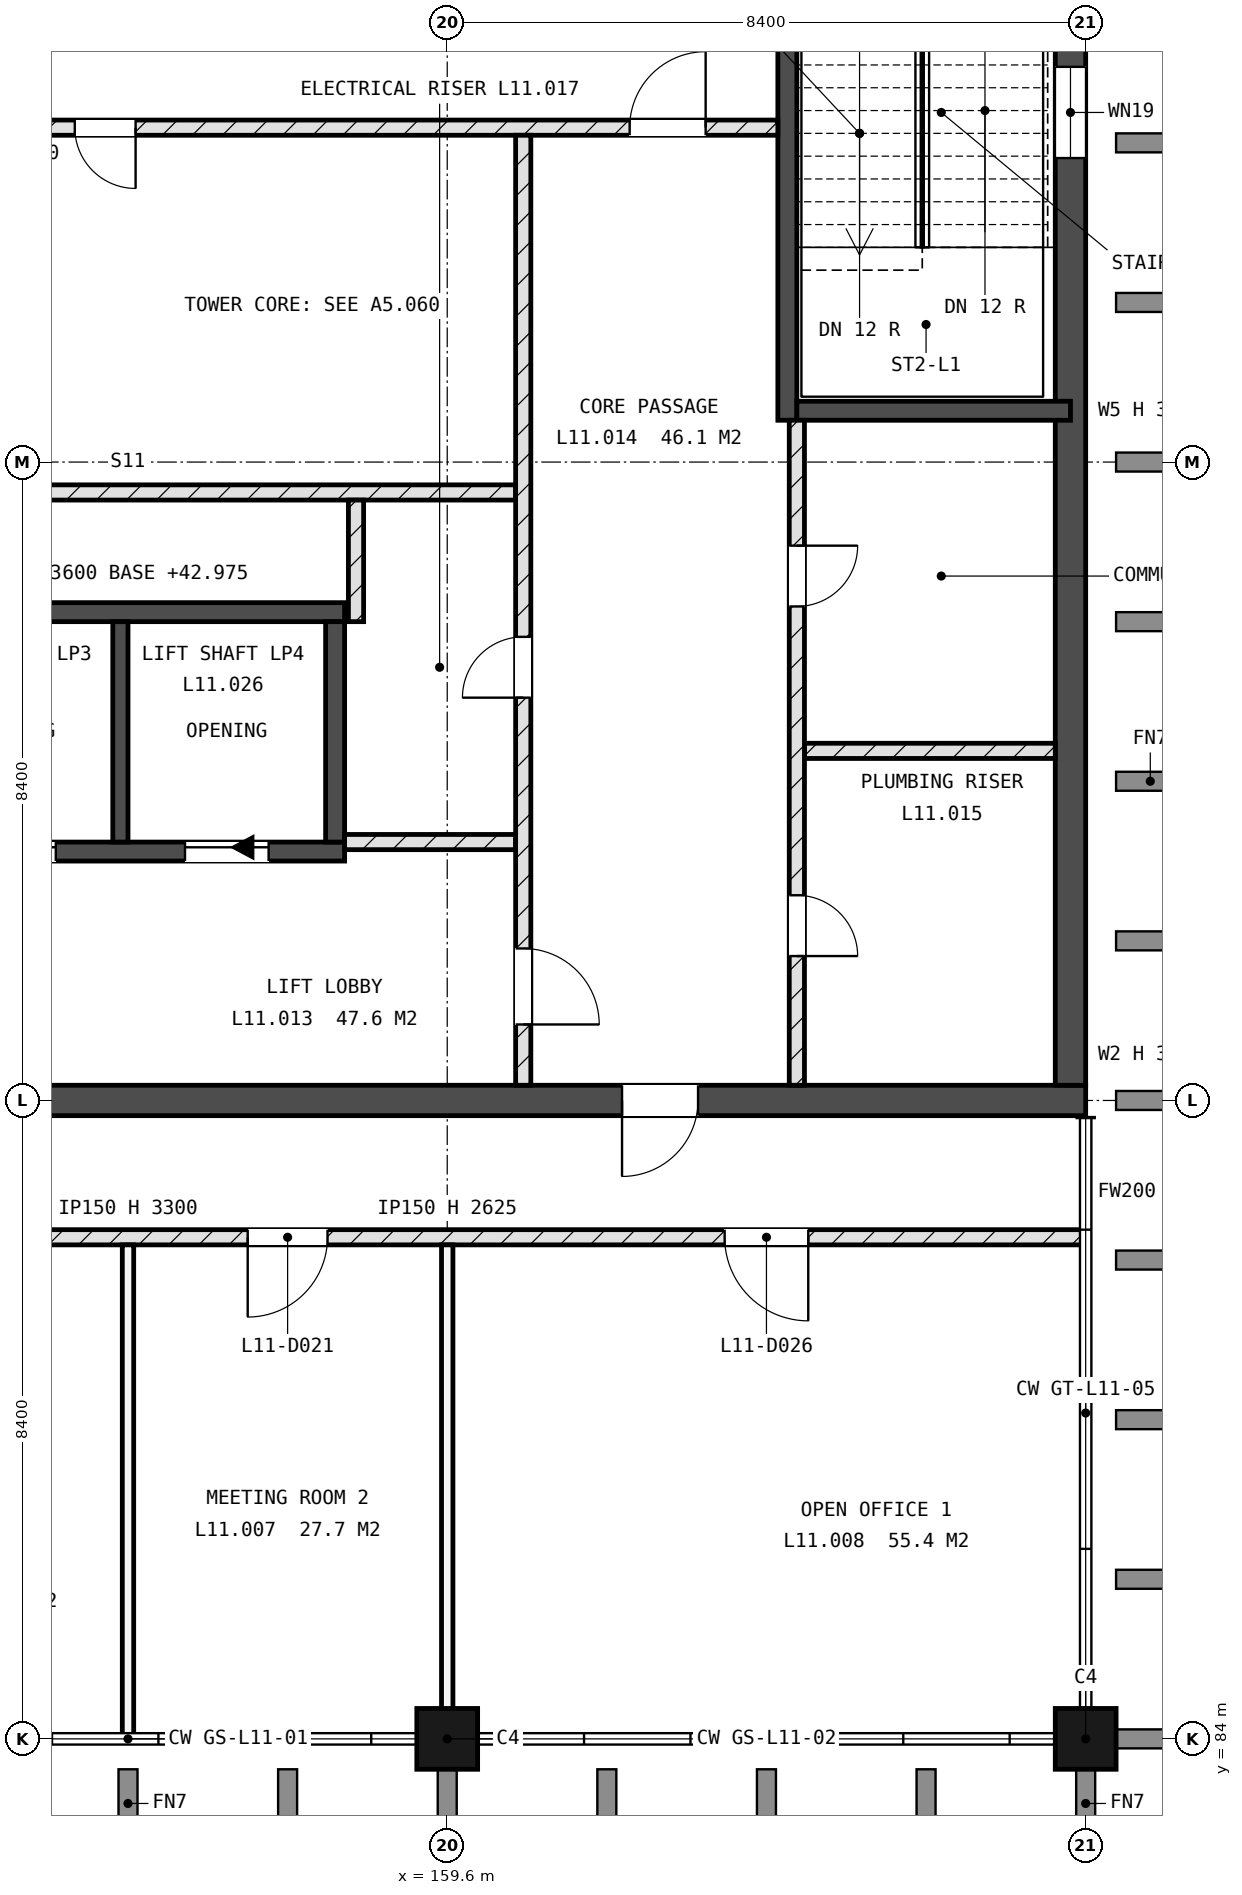
"""IFC4 building model, lengths in metres.
Left out: names, types, materials, properties, quantities, classifications, styles, units other than length and angle.
Written with IfcOpenShell. Run it as: python <this file> out.ifc"""

import sys

from ifc_helpers import new_model, si_unit, direction, frame, frame_2d, origin, origin_2d, place, context, subcontext, project, spatial, rectangle, extrude, element, fill, save


model = new_model("IFC4")
c1 = context("Model", 3, precision=1e-05, world=origin(), true_north=direction((0.0, 1.0)))
c2 = subcontext(c1, "Body", "Model", "MODEL_VIEW")
j1 = project(units=[si_unit("LENGTHUNIT", "METRE"), si_unit("PLANEANGLEUNIT", "RADIAN")], contexts=[c1])
p1 = place(None, origin())
s1 = spatial("IfcSite", under=j1, at=p1, CompositionType="ELEMENT")
p2 = place(p1, origin())
s2 = spatial("IfcBuilding", under=s1, at=p2, CompositionType="ELEMENT")
p3 = place(p2, frame((0.0, 0.0, 43.2)))
s3 = spatial("IfcBuildingStorey", under=s2, at=p3, CompositionType="ELEMENT", Elevation=43.2)
for number, where, z_axis, x_axis in (
    (1, (159.6, 84.0, -0.225), (0.0, 0.0, 1.0), (1.0, 0.0, 0.0)),
    (2, (168.0, 84.0, -0.225), (0.0, 0.0, 1.0), (1.0, 0.0, 0.0)),
):
    element("IfcColumn", number, at=place(p3, frame(where, z_axis=z_axis, x_axis=x_axis)), inside=s3, PredefinedType="COLUMN", context=c2, shape_type="SweptSolid", body=[
        extrude(rectangle(XDim=0.8, YDim=0.8, at=origin_2d()), origin(), (0.0, 0.0, 1.0), 3.6),
    ])
p4 = place(p3, frame((142.8, 92.4, -0.225), z_axis=(0.0, 0.0, 1.0), x_axis=(1.0, 0.0, 0.0)))
e3 = element("IfcWall", 3, at=p4, inside=s3, PredefinedType="SHEAR", context=c2, shape_type="SweptSolid", body=[
    extrude(rectangle(XDim=25.2, YDim=0.4, at=frame_2d((12.6, 0.0))), origin(), (0.0, 0.0, 1.0), 3.6),
])
p5 = place(p4, frame((1.4, 0.0, 0.225)))
e4 = element("IfcOpeningElement", 4, at=p5, cuts=e3, PredefinedType="OPENING", context=c2, shape_type="SweptSolid", body=[
    extrude(rectangle(XDim=1.0, YDim=2.1, at=frame_2d((0.5, 1.05))), frame((0.0, 0.21, 0.0), z_axis=(0.0, -1.0, 0.0), x_axis=(1.0, 0.0, 0.0)), (0.0, 0.0, 1.0), 0.42),
])
p6 = place(p4, frame((19.1, 0.0, 0.225)))
e5 = element("IfcOpeningElement", 5, at=p6, cuts=e3, PredefinedType="OPENING", context=c2, shape_type="SweptSolid", body=[
    extrude(rectangle(XDim=1.0, YDim=2.1, at=frame_2d((0.5, 1.05))), frame((0.0, 0.21, 0.0), z_axis=(0.0, -1.0, 0.0), x_axis=(1.0, 0.0, 0.0)), (0.0, 0.0, 1.0), 0.42),
])
p7 = place(p4, frame((10.4, 0.0, 0.225)))
e6 = element("IfcOpeningElement", 6, at=p7, cuts=e3, PredefinedType="OPENING", context=c2, shape_type="SweptSolid", body=[
    extrude(rectangle(XDim=1.0, YDim=2.1, at=frame_2d((0.5, 1.05))), frame((0.0, 0.21, 0.0), z_axis=(0.0, -1.0, 0.0), x_axis=(1.0, 0.0, 0.0)), (0.0, 0.0, 1.0), 0.42),
])
p8 = place(p3, frame((167.8, 92.6, -0.225), z_axis=(0.0, 0.0, 1.0), x_axis=(0.0, 1.0, 0.0)))
e7 = element("IfcWall", 7, at=p8, inside=s3, PredefinedType="SHEAR", context=c2, shape_type="SweptSolid", body=[
    extrude(rectangle(XDim=16.4, YDim=0.4, at=frame_2d((8.2, 0.0))), origin(), (0.0, 0.0, 1.0), 3.6),
])
p9 = place(p8, frame((12.2, 0.0, 1.825)))
e8 = element("IfcOpeningElement", 8, at=p9, cuts=e7, PredefinedType="OPENING", context=c2, shape_type="SweptSolid", body=[
    extrude(rectangle(XDim=1.2, YDim=0.9, at=frame_2d((0.6, 0.45))), frame((0.0, 0.21, 0.0), z_axis=(0.0, -1.0, 0.0), x_axis=(1.0, 0.0, 0.0)), (0.0, 0.0, 1.0), 0.42),
])
p10 = place(p3, frame((164.075, 101.35, -0.225), z_axis=(0.0, 0.0, 1.0), x_axis=(0.0, 1.0, 0.0)))
e9 = element("IfcWall", 9, at=p10, inside=s3, PredefinedType="SHEAR", context=c2, shape_type="SweptSolid", body=[
    extrude(rectangle(XDim=7.65, YDim=0.25, at=frame_2d((3.825, 0.0))), origin(), (0.0, 0.0, 1.0), 3.6),
])
p11 = place(p10, frame((6.55, 0.0, 0.225)))
e10 = element("IfcOpeningElement", 10, at=p11, cuts=e9, PredefinedType="OPENING", context=c2, shape_type="SweptSolid", body=[
    extrude(rectangle(XDim=1.0, YDim=2.1, at=frame_2d((0.5, 1.05))), frame((0.0, 0.135, 0.0), z_axis=(0.0, -1.0, 0.0), x_axis=(1.0, 0.0, 0.0)), (0.0, 0.0, 1.0), 0.27),
])
p12 = place(p3, frame((164.2, 101.475, -0.225), z_axis=(0.0, 0.0, 1.0), x_axis=(1.0, 0.0, 0.0)))
e11 = element("IfcWall", 11, at=p12, inside=s3, PredefinedType="SHEAR", context=c2, shape_type="SweptSolid", body=[
    extrude(rectangle(XDim=3.6, YDim=0.25, at=frame_2d((1.8, 0.0))), origin(), (0.0, 0.0, 1.0), 3.6),
])
p13 = place(p3, frame((147.0, 95.675, -0.225), z_axis=(0.0, 0.0, 1.0), x_axis=(1.0, 0.0, 0.0)))
e12 = element("IfcWall", 12, at=p13, inside=s3, PredefinedType="SHEAR", context=c2, shape_type="SweptSolid", body=[
    extrude(rectangle(XDim=11.25, YDim=0.25, at=frame_2d((5.625, 0.0))), origin(), (0.0, 0.0, 1.0), 3.6),
])
p14 = place(p13, frame((0.75, 0.0, 0.225)))
e13 = element("IfcOpeningElement", 13, at=p14, cuts=e12, PredefinedType="OPENING", context=c2, shape_type="SweptSolid", body=[
    extrude(rectangle(XDim=1.1, YDim=2.1, at=frame_2d((0.55, 1.05))), frame((0.0, 0.135, 0.0), z_axis=(0.0, -1.0, 0.0), x_axis=(1.0, 0.0, 0.0)), (0.0, 0.0, 1.0), 0.27),
])
p15 = place(p13, frame((3.55, 0.0, 0.225)))
e14 = element("IfcOpeningElement", 14, at=p15, cuts=e12, PredefinedType="OPENING", context=c2, shape_type="SweptSolid", body=[
    extrude(rectangle(XDim=1.1, YDim=2.1, at=frame_2d((0.55, 1.05))), frame((0.0, 0.135, 0.0), z_axis=(0.0, -1.0, 0.0), x_axis=(1.0, 0.0, 0.0)), (0.0, 0.0, 1.0), 0.27),
])
p16 = place(p13, frame((6.35, 0.0, 0.225)))
e15 = element("IfcOpeningElement", 15, at=p16, cuts=e12, PredefinedType="OPENING", context=c2, shape_type="SweptSolid", body=[
    extrude(rectangle(XDim=1.1, YDim=2.1, at=frame_2d((0.55, 1.05))), frame((0.0, 0.135, 0.0), z_axis=(0.0, -1.0, 0.0), x_axis=(1.0, 0.0, 0.0)), (0.0, 0.0, 1.0), 0.27),
])
p17 = place(p13, frame((9.15, 0.0, 0.225)))
e16 = element("IfcOpeningElement", 16, at=p17, cuts=e12, PredefinedType="OPENING", context=c2, shape_type="SweptSolid", body=[
    extrude(rectangle(XDim=1.1, YDim=2.1, at=frame_2d((0.55, 1.05))), frame((0.0, 0.135, 0.0), z_axis=(0.0, -1.0, 0.0), x_axis=(1.0, 0.0, 0.0)), (0.0, 0.0, 1.0), 0.27),
])
p18 = place(p3, frame((147.0, 98.825, -0.225), z_axis=(0.0, 0.0, 1.0), x_axis=(1.0, 0.0, 0.0)))
e17 = element("IfcWall", 17, at=p18, inside=s3, PredefinedType="SHEAR", context=c2, shape_type="SweptSolid", body=[
    extrude(rectangle(XDim=11.25, YDim=0.25, at=frame_2d((5.625, 0.0))), origin(), (0.0, 0.0, 1.0), 3.6),
])
p19 = place(p3, frame((158.125, 95.8, -0.225), z_axis=(0.0, 0.0, 1.0), x_axis=(0.0, 1.0, 0.0)))
e18 = element("IfcWall", 18, at=p19, inside=s3, PredefinedType="SHEAR", context=c2, shape_type="SweptSolid", body=[
    extrude(rectangle(XDim=2.9, YDim=0.25, at=frame_2d((1.45, 0.0))), origin(), (0.0, 0.0, 1.0), 3.6),
])
p20 = place(p3, frame((155.3, 95.8, -0.225), z_axis=(0.0, 0.0, 1.0), x_axis=(0.0, 1.0, 0.0)))
e19 = element("IfcWall", 19, at=p20, inside=s3, PredefinedType="SHEAR", context=c2, shape_type="SweptSolid", body=[
    extrude(rectangle(XDim=2.9, YDim=0.2, at=frame_2d((1.45, 0.0))), origin(), (0.0, 0.0, 1.0), 3.6),
])
p21 = place(p3, frame((151.2, 90.6, 0.0), z_axis=(0.0, 0.0, 1.0), x_axis=(1.0, 0.0, 0.0)))
e20 = element("IfcWall", 20, at=p21, inside=s3, PredefinedType="SOLIDWALL", context=c2, shape_type="SweptSolid", body=[
    extrude(rectangle(XDim=16.8, YDim=0.2, at=frame_2d((8.4, 0.0))), origin(), (0.0, 0.0, 1.0), 3.3),
])
p22 = place(p21, frame((1.575, 0.0, 0.0)))
e21 = element("IfcOpeningElement", 21, at=p22, cuts=e20, PredefinedType="OPENING", context=c2, shape_type="SweptSolid", body=[
    extrude(rectangle(XDim=1.05, YDim=2.1, at=frame_2d((0.525, 1.05))), frame((0.0, 0.11, 0.0), z_axis=(0.0, -1.0, 0.0), x_axis=(1.0, 0.0, 0.0)), (0.0, 0.0, 1.0), 0.22),
])
p23 = place(p21, frame((5.775, 0.0, 0.0)))
e22 = element("IfcOpeningElement", 22, at=p23, cuts=e20, PredefinedType="OPENING", context=c2, shape_type="SweptSolid", body=[
    extrude(rectangle(XDim=1.05, YDim=2.1, at=frame_2d((0.525, 1.05))), frame((0.0, 0.11, 0.0), z_axis=(0.0, -1.0, 0.0), x_axis=(1.0, 0.0, 0.0)), (0.0, 0.0, 1.0), 0.22),
])
p24 = place(p21, frame((12.05, 0.0, 0.0)))
e23 = element("IfcOpeningElement", 23, at=p24, cuts=e20, PredefinedType="OPENING", context=c2, shape_type="SweptSolid", body=[
    extrude(rectangle(XDim=1.1, YDim=2.25, at=frame_2d((0.55, 1.125))), frame((0.0, 0.11, 0.0), z_axis=(0.0, -1.0, 0.0), x_axis=(1.0, 0.0, 0.0)), (0.0, 0.0, 1.0), 0.22),
])
p25 = place(p3, frame((158.25, 95.8, 0.0), z_axis=(0.0, 0.0, 1.0), x_axis=(1.0, 0.0, 0.0)))
e24 = element("IfcWall", 24, at=p25, inside=s3, PredefinedType="SOLIDWALL", context=c2, shape_type="SweptSolid", body=[
    extrude(rectangle(XDim=2.25, YDim=0.2, at=frame_2d((1.125, 0.0))), origin(), (0.0, 0.0, 1.0), 3.3),
])
p26 = place(p3, frame((164.3, 97.0, 0.0), z_axis=(0.0, 0.0, 1.0), x_axis=(1.0, 0.0, 0.0)))
e25 = element("IfcWall", 25, at=p26, inside=s3, PredefinedType="SOLIDWALL", context=c2, shape_type="SweptSolid", body=[
    extrude(rectangle(XDim=3.3, YDim=0.2, at=frame_2d((1.65, 0.0))), origin(), (0.0, 0.0, 1.0), 3.3),
])
p27 = place(p3, frame((146.5, 100.4, 0.0), z_axis=(0.0, 0.0, 1.0), x_axis=(1.0, 0.0, 0.0)))
e26 = element("IfcWall", 26, at=p27, inside=s3, PredefinedType="SOLIDWALL", context=c2, shape_type="SweptSolid", body=[
    extrude(rectangle(XDim=14.0, YDim=0.2, at=frame_2d((7.0, 0.0))), origin(), (0.0, 0.0, 1.0), 3.3),
])
p28 = place(p3, frame((143.2, 105.2, 0.0), z_axis=(0.0, 0.0, 1.0), x_axis=(1.0, 0.0, 0.0)))
e27 = element("IfcWall", 27, at=p28, inside=s3, PredefinedType="SOLIDWALL", context=c2, shape_type="SweptSolid", body=[
    extrude(rectangle(XDim=20.75, YDim=0.2, at=frame_2d((10.375, 0.0))), origin(), (0.0, 0.0, 1.0), 3.3),
])
p29 = place(p28, frame((11.5, 0.0, 0.0)))
e28 = element("IfcOpeningElement", 28, at=p29, cuts=e27, PredefinedType="OPENING", context=c2, shape_type="SweptSolid", body=[
    extrude(rectangle(XDim=0.8, YDim=2.1, at=frame_2d((0.4, 1.05))), frame((0.0, 0.11, 0.0), z_axis=(0.0, -1.0, 0.0), x_axis=(1.0, 0.0, 0.0)), (0.0, 0.0, 1.0), 0.22),
])
p30 = place(p28, frame((18.8, 0.0, 0.0)))
e29 = element("IfcOpeningElement", 29, at=p30, cuts=e27, PredefinedType="OPENING", context=c2, shape_type="SweptSolid", body=[
    extrude(rectangle(XDim=1.0, YDim=2.1, at=frame_2d((0.5, 1.05))), frame((0.0, 0.11, 0.0), z_axis=(0.0, -1.0, 0.0), x_axis=(1.0, 0.0, 0.0)), (0.0, 0.0, 1.0), 0.22),
])
p31 = place(p3, frame((155.4, 84.0, 0.0), z_axis=(0.0, 0.0, 1.0), x_axis=(0.0, 1.0, 0.0)))
e30 = element("IfcWall", 30, at=p31, inside=s3, PredefinedType="PARTITIONING", context=c2, shape_type="SweptSolid", body=[
    extrude(rectangle(XDim=6.5, YDim=0.15, at=frame_2d((3.25, 0.0))), origin(), (0.0, 0.0, 1.0), 3.3),
])
p32 = place(p3, frame((158.4, 98.7, 0.0), z_axis=(0.0, 0.0, 1.0), x_axis=(0.0, 1.0, 0.0)))
e31 = element("IfcWall", 31, at=p32, inside=s3, PredefinedType="SOLIDWALL", context=c2, shape_type="SweptSolid", body=[
    extrude(rectangle(XDim=1.6, YDim=0.2, at=frame_2d((0.8, 0.0))), origin(), (0.0, 0.0, 1.0), 3.3),
])
p33 = place(p3, frame((159.6, 84.0, 0.0), z_axis=(0.0, 0.0, 1.0), x_axis=(0.0, 1.0, 0.0)))
e32 = element("IfcWall", 32, at=p33, inside=s3, PredefinedType="PARTITIONING", context=c2, shape_type="SweptSolid", body=[
    extrude(rectangle(XDim=6.5, YDim=0.15, at=frame_2d((3.25, 0.0))), origin(), (0.0, 0.0, 1.0), 2.625),
])
p34 = place(p3, frame((160.6, 92.6, 0.0), z_axis=(0.0, 0.0, 1.0), x_axis=(0.0, 1.0, 0.0)))
e33 = element("IfcWall", 33, at=p34, inside=s3, PredefinedType="SOLIDWALL", context=c2, shape_type="SweptSolid", body=[
    extrude(rectangle(XDim=12.5, YDim=0.2, at=frame_2d((6.25, 0.0))), origin(), (0.0, 0.0, 1.0), 3.3),
])
p35 = place(p34, frame((5.1, 0.0, 0.0)))
e34 = element("IfcOpeningElement", 34, at=p35, cuts=e33, PredefinedType="OPENING", context=c2, shape_type="SweptSolid", body=[
    extrude(rectangle(XDim=0.8, YDim=2.1, at=frame_2d((0.4, 1.05))), frame((0.0, 0.11, 0.0), z_axis=(0.0, -1.0, 0.0), x_axis=(1.0, 0.0, 0.0)), (0.0, 0.0, 1.0), 0.22),
])
p36 = place(p34, frame((0.8, 0.0, 0.0)))
e35 = element("IfcOpeningElement", 35, at=p36, cuts=e33, PredefinedType="OPENING", context=c2, shape_type="SweptSolid", body=[
    extrude(rectangle(XDim=1.0, YDim=2.1, at=frame_2d((0.5, 1.05))), frame((0.0, 0.11, 0.0), z_axis=(0.0, -1.0, 0.0), x_axis=(1.0, 0.0, 0.0)), (0.0, 0.0, 1.0), 0.22),
])
p37 = place(p3, frame((164.2, 92.6, 0.0), z_axis=(0.0, 0.0, 1.0), x_axis=(0.0, 1.0, 0.0)))
e36 = element("IfcWall", 36, at=p37, inside=s3, PredefinedType="SOLIDWALL", context=c2, shape_type="SweptSolid", body=[
    extrude(rectangle(XDim=8.75, YDim=0.2, at=frame_2d((4.375, 0.0))), origin(), (0.0, 0.0, 1.0), 3.3),
])
p38 = place(p37, frame((1.7, 0.0, 0.0)))
e37 = element("IfcOpeningElement", 37, at=p38, cuts=e36, PredefinedType="OPENING", context=c2, shape_type="SweptSolid", body=[
    extrude(rectangle(XDim=0.8, YDim=2.1, at=frame_2d((0.4, 1.05))), frame((0.0, 0.11, 0.0), z_axis=(0.0, -1.0, 0.0), x_axis=(1.0, 0.0, 0.0)), (0.0, 0.0, 1.0), 0.22),
])
p39 = place(p37, frame((6.3, 0.0, 0.0)))
e38 = element("IfcOpeningElement", 38, at=p39, cuts=e36, PredefinedType="OPENING", context=c2, shape_type="SweptSolid", body=[
    extrude(rectangle(XDim=0.8, YDim=2.1, at=frame_2d((0.4, 1.05))), frame((0.0, 0.11, 0.0), z_axis=(0.0, -1.0, 0.0), x_axis=(1.0, 0.0, 0.0)), (0.0, 0.0, 1.0), 0.22),
])
p40 = place(p9, origin())
e39 = element("IfcWindow", 39, at=p40, inside=s3, PartitioningType="SINGLE_PANEL", PredefinedType="WINDOW", context=c2, shape_type="SweptSolid", body=[
    extrude(rectangle(XDim=1.2, YDim=0.9, at=frame_2d((0.6, 0.45))), frame((0.0, 0.03, 0.0), z_axis=(0.0, -1.0, 0.0), x_axis=(1.0, 0.0, 0.0)), (0.0, 0.0, 1.0), 0.06),
])
fill(e8, e39)
p41 = place(p16, origin())
e40 = element("IfcDoor", 40, at=p41, inside=s3, OperationType="SLIDING_TO_LEFT", PredefinedType="DOOR", context=c2, shape_type="SweptSolid", body=[
    extrude(rectangle(XDim=1.1, YDim=2.1, at=frame_2d((0.55, 1.05))), frame((0.0, 0.025, 0.0), z_axis=(0.0, -1.0, 0.0), x_axis=(1.0, 0.0, 0.0)), (0.0, 0.0, 1.0), 0.05),
])
fill(e15, e40)
p42 = place(p17, origin())
e41 = element("IfcDoor", 41, at=p42, inside=s3, OperationType="SLIDING_TO_LEFT", PredefinedType="DOOR", context=c2, shape_type="SweptSolid", body=[
    extrude(rectangle(XDim=1.1, YDim=2.1, at=frame_2d((0.55, 1.05))), frame((0.0, 0.025, 0.0), z_axis=(0.0, -1.0, 0.0), x_axis=(1.0, 0.0, 0.0)), (0.0, 0.0, 1.0), 0.05),
])
fill(e16, e41)
p43 = place(p23, origin())
e42 = element("IfcDoor", 42, at=p43, inside=s3, OperationType="SINGLE_SWING_LEFT", PredefinedType="DOOR", context=c2, shape_type="SweptSolid", body=[
    extrude(rectangle(XDim=1.05, YDim=2.1, at=frame_2d((0.525, 1.05))), frame((0.0, 0.025, 0.0), z_axis=(0.0, -1.0, 0.0), x_axis=(1.0, 0.0, 0.0)), (0.0, 0.0, 1.0), 0.05),
])
fill(e22, e42)
p44 = place(p24, origin())
e43 = element("IfcDoor", 43, at=p44, inside=s3, OperationType="SINGLE_SWING_RIGHT", PredefinedType="DOOR", context=c2, shape_type="SweptSolid", body=[
    extrude(rectangle(XDim=1.1, YDim=2.25, at=frame_2d((0.55, 1.125))), frame((0.0, 0.025, 0.0), z_axis=(0.0, -1.0, 0.0), x_axis=(1.0, 0.0, 0.0)), (0.0, 0.0, 1.0), 0.05),
])
fill(e23, e43)
p45 = place(p38, origin())
e44 = element("IfcDoor", 44, at=p45, inside=s3, OperationType="SINGLE_SWING_LEFT", PredefinedType="DOOR", context=c2, shape_type="SweptSolid", body=[
    extrude(rectangle(XDim=0.8, YDim=2.1, at=frame_2d((0.4, 1.05))), frame((0.0, 0.025, 0.0), z_axis=(0.0, -1.0, 0.0), x_axis=(1.0, 0.0, 0.0)), (0.0, 0.0, 1.0), 0.05),
])
fill(e37, e44)
p46 = place(p39, origin())
e45 = element("IfcDoor", 45, at=p46, inside=s3, OperationType="SINGLE_SWING_RIGHT", PredefinedType="DOOR", context=c2, shape_type="SweptSolid", body=[
    extrude(rectangle(XDim=0.8, YDim=2.1, at=frame_2d((0.4, 1.05))), frame((0.0, 0.025, 0.0), z_axis=(0.0, -1.0, 0.0), x_axis=(1.0, 0.0, 0.0)), (0.0, 0.0, 1.0), 0.05),
])
fill(e38, e45)
p47 = place(p35, origin())
e46 = element("IfcDoor", 46, at=p47, inside=s3, OperationType="SINGLE_SWING_RIGHT", PredefinedType="DOOR", context=c2, shape_type="SweptSolid", body=[
    extrude(rectangle(XDim=0.8, YDim=2.1, at=frame_2d((0.4, 1.05))), frame((0.0, 0.025, 0.0), z_axis=(0.0, -1.0, 0.0), x_axis=(1.0, 0.0, 0.0)), (0.0, 0.0, 1.0), 0.05),
])
fill(e34, e46)
p48 = place(p29, origin())
e47 = element("IfcDoor", 47, at=p48, inside=s3, OperationType="SINGLE_SWING_RIGHT", PredefinedType="DOOR", context=c2, shape_type="SweptSolid", body=[
    extrude(rectangle(XDim=0.8, YDim=2.1, at=frame_2d((0.4, 1.05))), frame((0.0, 0.025, 0.0), z_axis=(0.0, -1.0, 0.0), x_axis=(1.0, 0.0, 0.0)), (0.0, 0.0, 1.0), 0.05),
])
fill(e28, e47)
p49 = place(p6, origin())
e48 = element("IfcDoor", 48, at=p49, inside=s3, OperationType="SINGLE_SWING_LEFT", PredefinedType="DOOR", context=c2, shape_type="SweptSolid", body=[
    extrude(rectangle(XDim=1.0, YDim=2.1, at=frame_2d((0.5, 1.05))), frame((0.0, 0.025, 0.0), z_axis=(0.0, -1.0, 0.0), x_axis=(1.0, 0.0, 0.0)), (0.0, 0.0, 1.0), 0.05),
])
fill(e5, e48)
p50 = place(p36, origin())
e49 = element("IfcDoor", 49, at=p50, inside=s3, OperationType="SINGLE_SWING_LEFT", PredefinedType="DOOR", context=c2, shape_type="SweptSolid", body=[
    extrude(rectangle(XDim=1.0, YDim=2.1, at=frame_2d((0.5, 1.05))), frame((0.0, 0.025, 0.0), z_axis=(0.0, -1.0, 0.0), x_axis=(1.0, 0.0, 0.0)), (0.0, 0.0, 1.0), 0.05),
])
fill(e35, e49)
p51 = place(p30, origin())
e50 = element("IfcDoor", 50, at=p51, inside=s3, OperationType="SINGLE_SWING_LEFT", PredefinedType="DOOR", context=c2, shape_type="SweptSolid", body=[
    extrude(rectangle(XDim=1.0, YDim=2.1, at=frame_2d((0.5, 1.05))), frame((0.0, 0.025, 0.0), z_axis=(0.0, -1.0, 0.0), x_axis=(1.0, 0.0, 0.0)), (0.0, 0.0, 1.0), 0.05),
])
fill(e29, e50)
save(model, sys.argv[1])
